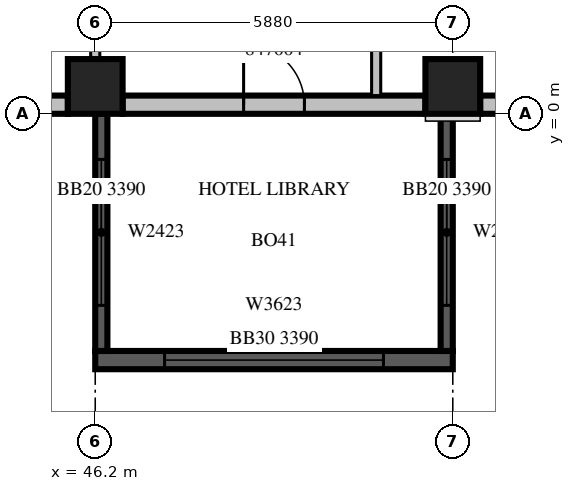
"""IFC4 building model, lengths in metres.
Left out: names, types, materials, properties, quantities, classifications, styles, units other than length and angle.
Written with IfcOpenShell. Run it as: python <this file> out.ifc"""

import sys

from ifc_helpers import new_model, si_unit, direction, frame, frame_2d, origin, origin_2d, place, context, subcontext, project, spatial, rectangle, extrude, source, transform, mapped, element, fill, save


model = new_model("IFC4")
c1 = context("Model", 3, precision=1e-05, world=origin(), true_north=direction((0.0, 1.0)))
c2 = subcontext(c1, "Body", "Model", "MODEL_VIEW")
j1 = project(units=[si_unit("LENGTHUNIT", "METRE"), si_unit("PLANEANGLEUNIT", "RADIAN")], contexts=[c1])
p1 = place(None, origin())
s1 = spatial("IfcSite", under=j1, at=p1, CompositionType="ELEMENT")
p2 = place(p1, origin())
s2 = spatial("IfcBuilding", under=s1, at=p2, CompositionType="ELEMENT")
p3 = place(p2, frame((0.0, 0.0, 212.0)))
s3 = spatial("IfcBuildingStorey", under=s2, at=p3, CompositionType="ELEMENT", Elevation=212.0)
m1 = source(origin(), c2, "Body", "SweptSolid", [
    extrude(rectangle(XDim=0.9, YDim=0.9, at=origin_2d()), origin(), (0.0, 0.0, 1.0), 3.8),
])
for number, where, z_axis, x_axis in (
    (1, (46.2, 0.45, 0.0), (0.0, 0.0, 1.0), (1.0, 0.0, 0.0)),
    (2, (52.08, 0.45, 0.0), (0.0, 0.0, 1.0), (1.0, 0.0, 0.0)),
):
    element("IfcColumn", number, at=place(p3, frame(where, z_axis=z_axis, x_axis=x_axis)), inside=s3, PredefinedType="COLUMN", context=c2, shape_type="MappedRepresentation", body=[
        mapped(m1, transform((0.0, 0.0, 0.0), scale=1.0)),
    ])
m2 = source(origin(), c2, "Body", "SweptSolid", [
    extrude(rectangle(XDim=1.75, YDim=0.3, at=frame_2d((0.875, 0.0))), origin(), (0.0, 0.0, 1.0), 3.4),
])
p4 = place(p3, frame((44.0, 0.15, 0.0), z_axis=(0.0, 0.0, 1.0), x_axis=(1.0, 0.0, 0.0)))
e3 = element("IfcWall", 3, at=p4, inside=s3, PredefinedType="STANDARD", context=c2, shape_type="MappedRepresentation", body=[
    mapped(m2, transform((0.0, 0.0, 0.0), scale=1.0)),
])
m3 = source(origin(), c2, "Body", "SweptSolid", [
    extrude(rectangle(XDim=0.9, YDim=2.3, at=frame_2d((0.45, 1.15))), frame((0.0, 0.16, 0.0), z_axis=(0.0, -1.0, 0.0), x_axis=(1.0, 0.0, 0.0)), (0.0, 0.0, 1.0), 0.32),
])
p5 = place(p4, frame((0.425, 0.0, 0.6)))
e4 = element("IfcOpeningElement", 4, at=p5, cuts=e3, PredefinedType="OPENING", context=c2, shape_type="MappedRepresentation", body=[
    mapped(m3, transform((0.0, 0.0, 0.0), scale=1.0)),
])
m4 = source(origin(), c2, "Body", "SweptSolid", [
    extrude(rectangle(XDim=4.98, YDim=0.3, at=frame_2d((2.49, 0.0))), origin(), (0.0, 0.0, 1.0), 3.4),
])
p6 = place(p3, frame((46.65, 0.15, 0.0), z_axis=(0.0, 0.0, 1.0), x_axis=(1.0, 0.0, 0.0)))
e5 = element("IfcWall", 5, at=p6, inside=s3, PredefinedType="STANDARD", context=c2, shape_type="MappedRepresentation", body=[
    mapped(m4, transform((0.0, 0.0, 0.0), scale=1.0)),
])
m5 = source(origin(), c2, "Body", "SweptSolid", [
    extrude(rectangle(XDim=1.0, YDim=2.1, at=frame_2d((0.5, 1.05))), frame((0.0, 0.16, 0.0), z_axis=(0.0, -1.0, 0.0), x_axis=(1.0, 0.0, 0.0)), (0.0, 0.0, 1.0), 0.32),
])
p7 = place(p6, frame((1.99, 0.0, 0.0)))
e6 = element("IfcOpeningElement", 6, at=p7, cuts=e5, PredefinedType="OPENING", context=c2, shape_type="MappedRepresentation", body=[
    mapped(m5, transform((0.0, 0.0, 0.0), scale=1.0)),
])
m6 = source(origin(), c2, "Body", "SweptSolid", [
    extrude(rectangle(XDim=2.91, YDim=0.3, at=frame_2d((1.455, 0.0))), origin(), (0.0, 0.0, 1.0), 3.4),
])
p8 = place(p3, frame((52.53, 0.15, 0.0), z_axis=(0.0, 0.0, 1.0), x_axis=(1.0, 0.0, 0.0)))
e7 = element("IfcWall", 7, at=p8, inside=s3, PredefinedType="STANDARD", context=c2, shape_type="MappedRepresentation", body=[
    mapped(m6, transform((0.0, 0.0, 0.0), scale=1.0)),
])
m7 = source(origin(), c2, "Body", "SweptSolid", [
    extrude(rectangle(XDim=1.8, YDim=2.3, at=frame_2d((0.9, 1.15))), frame((0.0, 0.16, 0.0), z_axis=(0.0, -1.0, 0.0), x_axis=(1.0, 0.0, 0.0)), (0.0, 0.0, 1.0), 0.32),
])
p9 = place(p8, frame((0.33, 0.0, 0.6)))
e8 = element("IfcOpeningElement", 8, at=p9, cuts=e7, PredefinedType="OPENING", context=c2, shape_type="MappedRepresentation", body=[
    mapped(m7, transform((0.0, 0.0, 0.0), scale=1.0)),
])
m8 = source(origin(), c2, "Body", "SweptSolid", [
    extrude(rectangle(XDim=5.88, YDim=0.3, at=frame_2d((2.94, 0.0))), origin(), (0.0, 0.0, 1.0), 3.39),
])
p10 = place(p3, frame((46.2, -4.05, 0.0), z_axis=(0.0, 0.0, 1.0), x_axis=(1.0, 0.0, 0.0)))
e9 = element("IfcWall", 9, at=p10, inside=s3, PredefinedType="SOLIDWALL", context=c2, shape_type="MappedRepresentation", body=[
    mapped(m8, transform((0.0, 0.0, 0.0), scale=1.0)),
])
m9 = source(origin(), c2, "Body", "SweptSolid", [
    extrude(rectangle(XDim=3.6, YDim=2.3, at=frame_2d((1.8, 1.15))), frame((0.0, 0.16, 0.0), z_axis=(0.0, -1.0, 0.0), x_axis=(1.0, 0.0, 0.0)), (0.0, 0.0, 1.0), 0.32),
])
p11 = place(p10, frame((1.14, 0.0, 0.6)))
e10 = element("IfcOpeningElement", 10, at=p11, cuts=e9, PredefinedType="OPENING", context=c2, shape_type="MappedRepresentation", body=[
    mapped(m9, transform((0.0, 0.0, 0.0), scale=1.0)),
])
m10 = source(origin(), c2, "Body", "SweptSolid", [
    extrude(rectangle(XDim=3.9, YDim=0.2, at=frame_2d((1.95, 0.0))), origin(), (0.0, 0.0, 1.0), 3.39),
])
p12 = place(p3, frame((46.3, 0.0, 0.0), z_axis=(0.0, 0.0, 1.0), x_axis=(0.0, -1.0, 0.0)))
e11 = element("IfcWall", 11, at=p12, inside=s3, PredefinedType="SOLIDWALL", context=c2, shape_type="MappedRepresentation", body=[
    mapped(m10, transform((0.0, 0.0, 0.0), scale=1.0)),
])
m11 = source(origin(), c2, "Body", "SweptSolid", [
    extrude(rectangle(XDim=2.4, YDim=2.3, at=frame_2d((1.2, 1.15))), frame((0.0, 0.11, 0.0), z_axis=(0.0, -1.0, 0.0), x_axis=(1.0, 0.0, 0.0)), (0.0, 0.0, 1.0), 0.22),
])
p13 = place(p12, frame((0.75, 0.0, 0.6)))
e12 = element("IfcOpeningElement", 12, at=p13, cuts=e11, PredefinedType="OPENING", context=c2, shape_type="MappedRepresentation", body=[
    mapped(m11, transform((0.0, 0.0, 0.0), scale=1.0)),
])
p14 = place(p3, frame((51.98, 0.0, 0.0), z_axis=(0.0, 0.0, 1.0), x_axis=(0.0, -1.0, 0.0)))
e13 = element("IfcWall", 13, at=p14, inside=s3, PredefinedType="SOLIDWALL", context=c2, shape_type="MappedRepresentation", body=[
    mapped(m10, transform((0.0, 0.0, 0.0), scale=1.0)),
])
p15 = place(p14, frame((0.75, 0.0, 0.6)))
e14 = element("IfcOpeningElement", 14, at=p15, cuts=e13, PredefinedType="OPENING", context=c2, shape_type="MappedRepresentation", body=[
    mapped(m11, transform((0.0, 0.0, 0.0), scale=1.0)),
])
m12 = source(origin(), c2, "Body", "SweptSolid", [
    extrude(rectangle(XDim=10.65, YDim=0.15, at=frame_2d((5.325, 0.0))), origin(), (0.0, 0.0, 1.0), 3.4),
])
p16 = place(p3, frame((50.82, 0.3, 0.0), z_axis=(0.0, 0.0, 1.0), x_axis=(0.0, 1.0, 0.0)))
e15 = element("IfcWall", 15, at=p16, inside=s3, PredefinedType="PARTITIONING", context=c2, shape_type="MappedRepresentation", body=[
    mapped(m12, transform((0.0, 0.0, 0.0), scale=1.0)),
])
m13 = source(origin(), c2, "Body", "SweptSolid", [
    extrude(rectangle(XDim=1.0, YDim=2.1, at=frame_2d((0.5, 1.05))), frame((0.0, 0.085, 0.0), z_axis=(0.0, -1.0, 0.0), x_axis=(1.0, 0.0, 0.0)), (0.0, 0.0, 1.0), 0.17),
])
p17 = place(p16, frame((6.325, 0.0, 0.0)))
e16 = element("IfcOpeningElement", 16, at=p17, cuts=e15, PredefinedType="OPENING", context=c2, shape_type="MappedRepresentation", body=[
    mapped(m13, transform((0.0, 0.0, 0.0), scale=1.0)),
])
m14 = source(origin(), c2, "Body", "SweptSolid", [
    extrude(rectangle(XDim=9.152, YDim=0.15, at=frame_2d((4.576, 0.0))), origin(), (0.0, 0.0, 1.0), 3.4),
])
p18 = place(p3, frame((46.2, 0.899, 0.0), z_axis=(0.0, 0.0, 1.0), x_axis=(0.0, 1.0, 0.0)))
e17 = element("IfcWall", 17, at=p18, inside=s3, PredefinedType="PARTITIONING", context=c2, shape_type="MappedRepresentation", body=[
    mapped(m14, transform((0.0, 0.0, 0.0), scale=1.0)),
])
m15 = source(origin(), c2, "Body", "SweptSolid", [
    extrude(rectangle(XDim=3.6, YDim=2.3, at=frame_2d((1.8, 1.15))), frame((0.0, 0.03, 0.0), z_axis=(0.0, -1.0, 0.0), x_axis=(1.0, 0.0, 0.0)), (0.0, 0.0, 1.0), 0.06),
])
p19 = place(p11, origin())
e18 = element("IfcWindow", 18, at=p19, inside=s3, PartitioningType="SINGLE_PANEL", PredefinedType="WINDOW", context=c2, shape_type="MappedRepresentation", body=[
    mapped(m15, transform((0.0, 0.0, 0.0), scale=1.0)),
])
fill(e10, e18)
m16 = source(origin(), c2, "Body", "SweptSolid", [
    extrude(rectangle(XDim=2.4, YDim=2.3, at=frame_2d((1.2, 1.15))), frame((0.0, 0.03, 0.0), z_axis=(0.0, -1.0, 0.0), x_axis=(1.0, 0.0, 0.0)), (0.0, 0.0, 1.0), 0.06),
])
p20 = place(p13, origin())
e19 = element("IfcWindow", 19, at=p20, inside=s3, PartitioningType="SINGLE_PANEL", PredefinedType="WINDOW", context=c2, shape_type="MappedRepresentation", body=[
    mapped(m16, transform((0.0, 0.0, 0.0), scale=1.0)),
])
fill(e12, e19)
p21 = place(p15, origin())
e20 = element("IfcWindow", 20, at=p21, inside=s3, PartitioningType="SINGLE_PANEL", PredefinedType="WINDOW", context=c2, shape_type="MappedRepresentation", body=[
    mapped(m16, transform((0.0, 0.0, 0.0), scale=1.0)),
])
fill(e14, e20)
m17 = source(origin(), c2, "Body", "SweptSolid", [
    extrude(rectangle(XDim=1.0, YDim=2.1, at=frame_2d((0.5, 1.05))), frame((0.0, 0.025, 0.0), z_axis=(0.0, -1.0, 0.0), x_axis=(1.0, 0.0, 0.0)), (0.0, 0.0, 1.0), 0.05),
])
p22 = place(p7, origin())
e21 = element("IfcDoor", 21, at=p22, inside=s3, OperationType="SINGLE_SWING_LEFT", PredefinedType="DOOR", context=c2, shape_type="MappedRepresentation", body=[
    mapped(m17, transform((0.0, 0.0, 0.0), scale=1.0)),
])
fill(e6, e21)
save(model, sys.argv[1])
